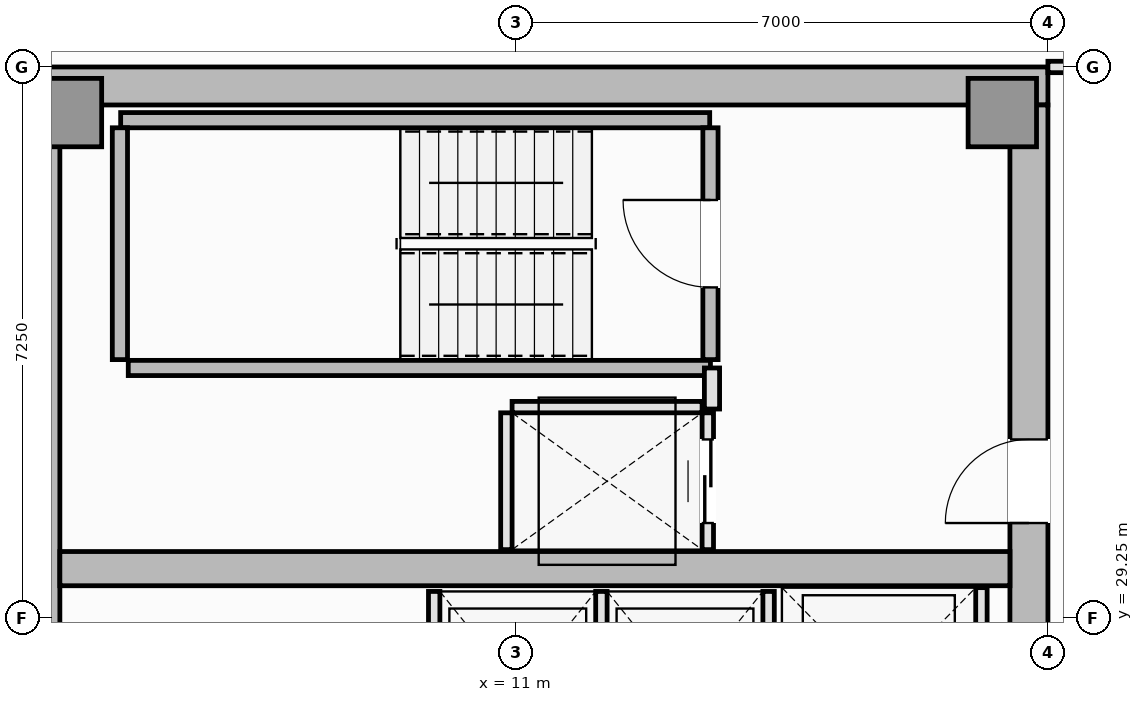
"""IFC4 building model, lengths in metres.
Left out: names, types, materials, properties, quantities, classifications, styles, units other than length and angle.
Written with IfcOpenShell. Run it as: python <this file> out.ifc"""

import sys

from ifc_helpers import new_model, si_unit, direction, frame, frame_2d, origin, origin_2d, place, context, subcontext, project, spatial, rectangle, extrude, element, fill, save


model = new_model("IFC4")
c1 = context("Model", 3, precision=1e-05, world=origin(), true_north=direction((0.0, 1.0)))
c2 = subcontext(c1, "Body", "Model", "MODEL_VIEW")
j1 = project(units=[si_unit("LENGTHUNIT", "METRE"), si_unit("PLANEANGLEUNIT", "RADIAN")], contexts=[c1])
p1 = place(None, origin())
s1 = spatial("IfcSite", under=j1, at=p1, CompositionType="ELEMENT")
p2 = place(p1, origin())
s2 = spatial("IfcBuilding", under=s1, at=p2, CompositionType="ELEMENT")
p3 = place(p2, frame((0.0, 0.0, 259.9)))
s3 = spatial("IfcBuildingStorey", under=s2, at=p3, CompositionType="ELEMENT", Elevation=259.9)
p4 = place(p3, frame((4.5, 36.25, 0.0), z_axis=(0.0, 0.0, 1.0), x_axis=(1.0, 0.0, 0.0)))
e1 = element("IfcWall", 1, at=p4, inside=s3, PredefinedType="SHEAR", context=c2, shape_type="SweptSolid", body=[
    extrude(rectangle(XDim=13.5, YDim=0.5, at=frame_2d((6.75, 0.0))), origin(), (0.0, 0.0, 1.0), 3.55),
])
p5 = place(p3, frame((4.75, 14.5, 0.0), z_axis=(0.0, 0.0, 1.0), x_axis=(0.0, 1.0, 0.0)))
e2 = element("IfcWall", 2, at=p5, inside=s3, PredefinedType="SHEAR", context=c2, shape_type="SweptSolid", body=[
    extrude(rectangle(XDim=21.5, YDim=0.5, at=frame_2d((10.75, 0.0))), origin(), (0.0, 0.0, 1.0), 3.55),
])
p6 = place(p3, frame((17.75, 27.05, 0.0), z_axis=(0.0, 0.0, 1.0), x_axis=(0.0, 1.0, 0.0)))
e3 = element("IfcWall", 3, at=p6, inside=s3, PredefinedType="SHEAR", context=c2, shape_type="SweptSolid", body=[
    extrude(rectangle(XDim=8.95, YDim=0.5, at=frame_2d((4.475, 0.0))), origin(), (0.0, 0.0, 1.0), 3.55),
])
p7 = place(p6, frame((3.45, 0.0, 0.0)))
e4 = element("IfcOpeningElement", 4, at=p7, cuts=e3, PredefinedType="OPENING", context=c2, shape_type="SweptSolid", body=[
    extrude(rectangle(XDim=1.1, YDim=2.15, at=frame_2d((0.55, 1.075))), frame((0.0, 0.26, 0.0), z_axis=(0.0, -1.0, 0.0), x_axis=(1.0, 0.0, 0.0)), (0.0, 0.0, 1.0), 0.52),
])
p8 = place(p3, frame((5.0, 29.9, 0.0), z_axis=(0.0, 0.0, 1.0), x_axis=(1.0, 0.0, 0.0)))
e5 = element("IfcWall", 5, at=p8, inside=s3, PredefinedType="SHEAR", context=c2, shape_type="SweptSolid", body=[
    extrude(rectangle(XDim=12.5, YDim=0.45, at=frame_2d((6.25, 0.0))), origin(), (0.0, 0.0, 1.0), 3.55),
])
for number, where, z_axis, x_axis in (
    (6, (5.1, 35.9, 0.0), (0.0, 0.0, 1.0), (1.0, 0.0, 0.0)),
    (7, (17.4, 35.9, 0.0), (0.0, 0.0, 1.0), (1.0, 0.0, 0.0)),
):
    element("IfcColumn", number, at=place(p3, frame(where, z_axis=z_axis, x_axis=x_axis)), inside=s3, PredefinedType="PILASTER", context=c2, shape_type="SweptSolid", body=[
        extrude(rectangle(XDim=0.9, YDim=0.9, at=origin_2d()), origin(), (0.0, 0.0, 1.0), 3.55),
    ])
p9 = place(p3, frame((5.8, 35.8, 0.0), z_axis=(0.0, 0.0, 1.0), x_axis=(1.0, 0.0, 0.0)))
e8 = element("IfcWall", 8, at=p9, inside=s3, PredefinedType="SOLIDWALL", context=c2, shape_type="SweptSolid", body=[
    extrude(rectangle(XDim=7.75, YDim=0.2, at=frame_2d((3.875, 0.0))), origin(), (0.0, 0.0, 1.0), 3.55),
])
p10 = place(p3, frame((5.79, 32.65, 0.0), z_axis=(0.0, 0.0, 1.0), x_axis=(0.0, 1.0, 0.0)))
e9 = element("IfcWall", 9, at=p10, inside=s3, PredefinedType="SOLIDWALL", context=c2, shape_type="SweptSolid", body=[
    extrude(rectangle(XDim=3.05, YDim=0.2, at=frame_2d((1.525, 0.0))), origin(), (0.0, 0.0, 1.0), 3.55),
])
p11 = place(p3, frame((5.9, 32.54, 0.0), z_axis=(0.0, 0.0, 1.0), x_axis=(1.0, 0.0, 0.0)))
e10 = element("IfcWall", 10, at=p11, inside=s3, PredefinedType="SOLIDWALL", context=c2, shape_type="SweptSolid", body=[
    extrude(rectangle(XDim=7.66, YDim=0.2, at=frame_2d((3.83, 0.0))), origin(), (0.0, 0.0, 1.0), 3.55),
])
p12 = place(p3, frame((13.56, 32.65, 0.0), z_axis=(0.0, 0.0, 1.0), x_axis=(0.0, 1.0, 0.0)))
e11 = element("IfcWall", 11, at=p12, inside=s3, PredefinedType="SOLIDWALL", context=c2, shape_type="SweptSolid", body=[
    extrude(rectangle(XDim=3.05, YDim=0.2, at=frame_2d((1.525, 0.0))), origin(), (0.0, 0.0, 1.0), 3.55),
])
p13 = place(p12, frame((0.95, 0.0, 0.0)))
e12 = element("IfcOpeningElement", 12, at=p13, cuts=e11, PredefinedType="OPENING", context=c2, shape_type="SweptSolid", body=[
    extrude(rectangle(XDim=1.15, YDim=2.15, at=frame_2d((0.575, 1.075))), frame((0.0, 0.11, 0.0), z_axis=(0.0, -1.0, 0.0), x_axis=(1.0, 0.0, 0.0)), (0.0, 0.0, 1.0), 0.22),
])
for number, where, z_axis, x_axis in (
    (13, (9.925, 27.05, 0.0), (0.0, 0.0, 1.0), (0.0, 1.0, 0.0)),
    (14, (12.125, 27.05, 0.0), (0.0, 0.0, 1.0), (0.0, 1.0, 0.0)),
    (15, (14.325, 27.05, 0.0), (0.0, 0.0, 1.0), (0.0, 1.0, 0.0)),
):
    element("IfcWall", number, at=place(p3, frame(where, z_axis=z_axis, x_axis=x_axis)), inside=s3, PredefinedType="PARTITIONING", context=c2, shape_type="SweptSolid", body=[
        extrude(rectangle(XDim=2.55, YDim=0.15, at=frame_2d((1.275, 0.0))), origin(), (0.0, 0.0, 1.0), 3.39),
    ])
p14 = place(p3, frame((17.125, 27.05, 0.0), z_axis=(0.0, 0.0, 1.0), x_axis=(0.0, 1.0, 0.0)))
e16 = element("IfcWall", 16, at=p14, inside=s3, PredefinedType="PARTITIONING", context=c2, shape_type="SweptSolid", body=[
    extrude(rectangle(XDim=2.6, YDim=0.15, at=frame_2d((1.3, 0.0))), origin(), (0.0, 0.0, 1.0), 3.39),
])
p15 = place(p3, frame((10.95, 32.025, 0.0), z_axis=(0.0, 0.0, 1.0), x_axis=(1.0, 0.0, 0.0)))
e17 = element("IfcWall", 17, at=p15, inside=s3, PredefinedType="PARTITIONING", context=c2, shape_type="SweptSolid", body=[
    extrude(rectangle(XDim=2.5, YDim=0.15, at=frame_2d((1.25, 0.0))), origin(), (0.0, 0.0, 1.0), 3.39),
])
p16 = place(p3, frame((10.875, 30.15, 0.0), z_axis=(0.0, 0.0, 1.0), x_axis=(0.0, 1.0, 0.0)))
e18 = element("IfcWall", 18, at=p16, inside=s3, PredefinedType="PARTITIONING", context=c2, shape_type="SweptSolid", body=[
    extrude(rectangle(XDim=1.8, YDim=0.15, at=frame_2d((0.9, 0.0))), origin(), (0.0, 0.0, 1.0), 3.39),
])
p17 = place(p3, frame((13.525, 30.15, 0.0), z_axis=(0.0, 0.0, 1.0), x_axis=(0.0, 1.0, 0.0)))
e19 = element("IfcWall", 19, at=p17, inside=s3, PredefinedType="PARTITIONING", context=c2, shape_type="SweptSolid", body=[
    extrude(rectangle(XDim=1.8, YDim=0.15, at=frame_2d((0.9, 0.0))), origin(), (0.0, 0.0, 1.0), 3.39),
])
p18 = place(p17, frame((0.35, 0.0, 0.0)))
e20 = element("IfcOpeningElement", 20, at=p18, cuts=e19, PredefinedType="OPENING", context=c2, shape_type="SweptSolid", body=[
    extrude(rectangle(XDim=1.1, YDim=2.2, at=frame_2d((0.55, 1.1))), frame((0.0, 0.085, 0.0), z_axis=(0.0, -1.0, 0.0), x_axis=(1.0, 0.0, 0.0)), (0.0, 0.0, 1.0), 0.17),
])
p19 = place(p3, frame((13.58, 32.0, 0.0), z_axis=(0.0, 0.0, 1.0), x_axis=(0.0, 1.0, 0.0)))
e21 = element("IfcWall", 21, at=p19, inside=s3, PredefinedType="PARTITIONING", context=c2, shape_type="SweptSolid", body=[
    extrude(rectangle(XDim=0.54, YDim=0.2, at=frame_2d((0.27, 0.0))), origin(), (0.0, 0.0, 1.0), 3.39),
])
p20 = place(p3, frame((18.0, 36.5, 0.0), z_axis=(0.0, 0.0, 1.0), x_axis=(1.0, 0.0, 0.0)))
e22 = element("IfcWall", 22, at=p20, inside=s3, PredefinedType="PARTITIONING", context=c2, shape_type="SweptSolid", body=[
    extrude(rectangle(XDim=1.9, YDim=0.15, at=frame_2d((0.95, 0.0))), origin(), (0.0, 0.0, 1.0), 3.39),
])
p21 = place(p20, frame((0.5, 0.0, 0.0)))
e23 = element("IfcOpeningElement", 23, at=p21, cuts=e22, PredefinedType="OPENING", context=c2, shape_type="SweptSolid", body=[
    extrude(rectangle(XDim=0.9, YDim=2.1, at=frame_2d((0.45, 1.05))), frame((0.0, 0.085, 0.0), z_axis=(0.0, -1.0, 0.0), x_axis=(1.0, 0.0, 0.0)), (0.0, 0.0, 1.0), 0.17),
])
p22 = place(p13, origin())
e24 = element("IfcDoor", 24, at=p22, inside=s3, OperationType="SINGLE_SWING_RIGHT", PredefinedType="DOOR", context=c2, shape_type="SweptSolid", body=[
    extrude(rectangle(XDim=1.15, YDim=2.15, at=frame_2d((0.575, 1.075))), frame((0.0, 0.025, 0.0), z_axis=(0.0, -1.0, 0.0), x_axis=(1.0, 0.0, 0.0)), (0.0, 0.0, 1.0), 0.05),
])
fill(e12, e24)
p23 = place(p18, origin())
e25 = element("IfcDoor", 25, at=p23, inside=s3, OperationType="DOUBLE_DOOR_SLIDING", PredefinedType="DOOR", context=c2, shape_type="SweptSolid", body=[
    extrude(rectangle(XDim=1.1, YDim=2.2, at=frame_2d((0.55, 1.1))), frame((0.0, 0.025, 0.0), z_axis=(0.0, -1.0, 0.0), x_axis=(1.0, 0.0, 0.0)), (0.0, 0.0, 1.0), 0.05),
])
fill(e20, e25)
p24 = place(p7, origin())
e26 = element("IfcDoor", 26, at=p24, inside=s3, OperationType="SINGLE_SWING_LEFT", PredefinedType="DOOR", context=c2, shape_type="SweptSolid", body=[
    extrude(rectangle(XDim=1.1, YDim=2.15, at=frame_2d((0.55, 1.075))), frame((0.0, 0.025, 0.0), z_axis=(0.0, -1.0, 0.0), x_axis=(1.0, 0.0, 0.0)), (0.0, 0.0, 1.0), 0.05),
])
fill(e4, e26)
save(model, sys.argv[1])
